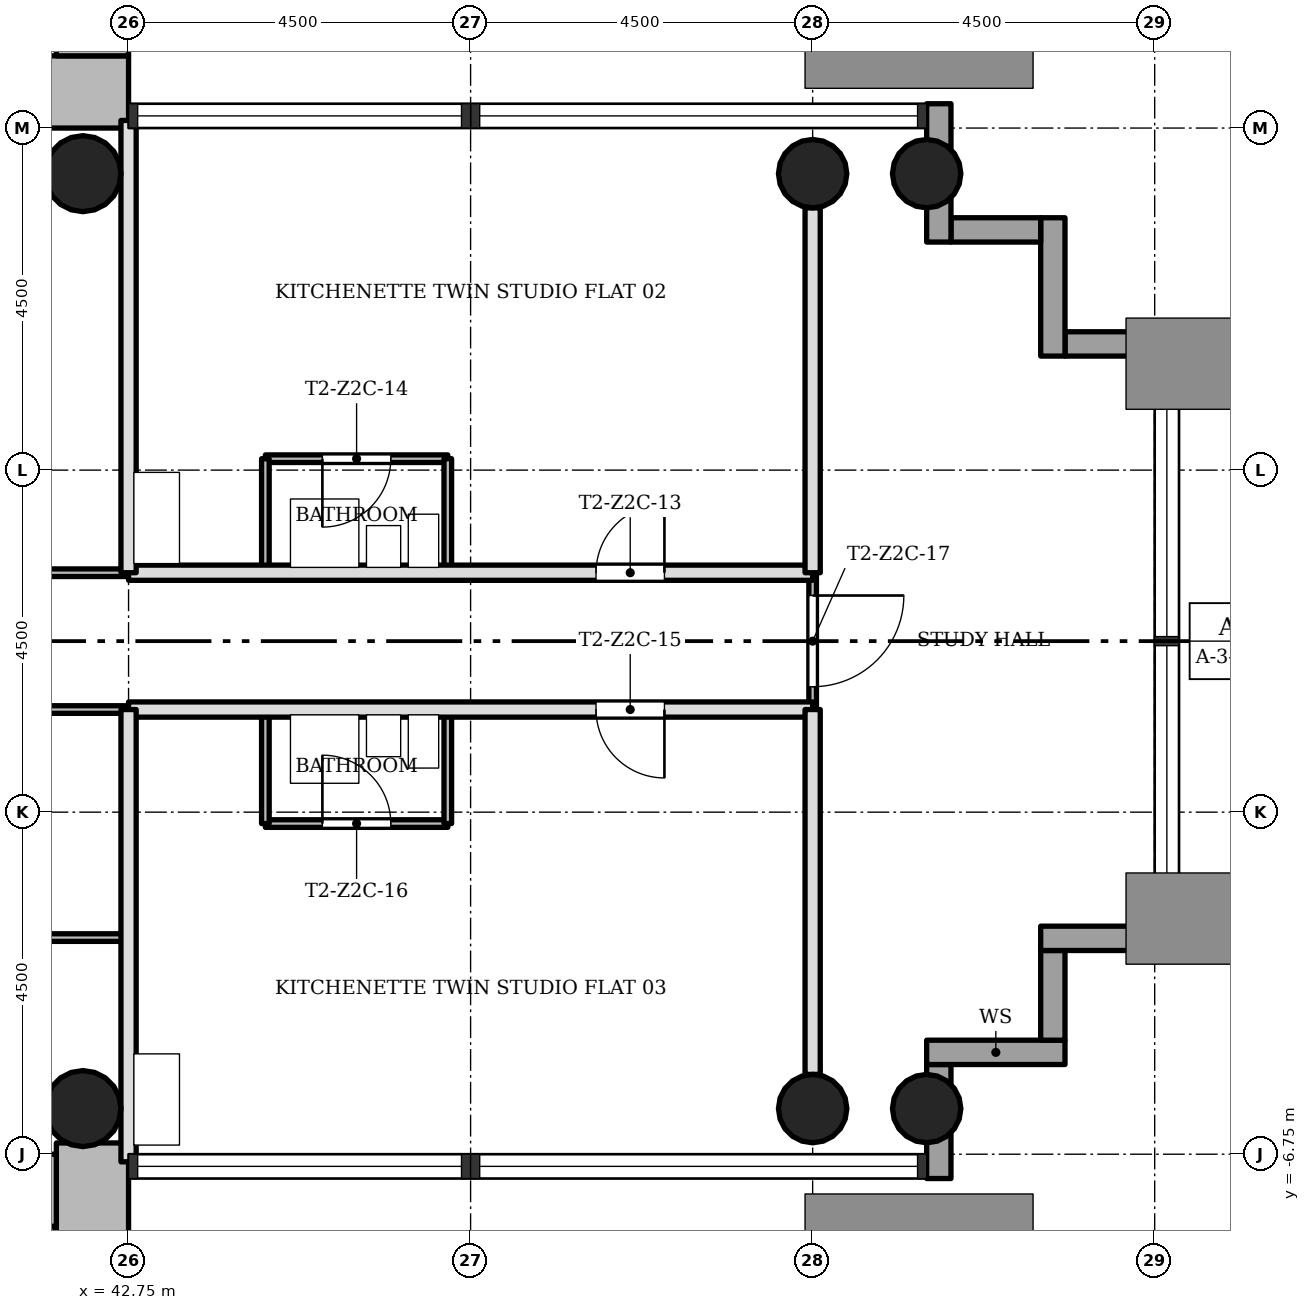
"""IFC4 building model, lengths in metres.
Left out: names, types, materials, properties, quantities, classifications, styles, units other than length and angle.
Written with IfcOpenShell. Run it as: python <this file> out.ifc"""

import sys

from ifc_helpers import new_model, si_unit, direction, frame, frame_2d, origin, origin_2d, place, context, subcontext, project, spatial, rectangle, hollow_circle, extrude, element, fill, save


model = new_model("IFC4")
c1 = context("Model", 3, precision=1e-05, world=origin(), true_north=direction((0.0, 1.0)))
c2 = subcontext(c1, "Body", "Model", "MODEL_VIEW")
j1 = project(units=[si_unit("LENGTHUNIT", "METRE"), si_unit("PLANEANGLEUNIT", "RADIAN")], contexts=[c1])
p1 = place(None, origin())
s1 = spatial("IfcSite", under=j1, at=p1, CompositionType="ELEMENT")
p2 = place(p1, origin())
s2 = spatial("IfcBuilding", under=s1, at=p2, CompositionType="ELEMENT")
p3 = place(p2, frame((0.0, 0.0, 93.6)))
s3 = spatial("IfcBuildingStorey", under=s2, at=p3, CompositionType="ELEMENT", Elevation=93.6)
p4 = place(p3, frame((30.2, 7.225, 0.0), z_axis=(0.0, 0.0, 1.0), x_axis=(1.0, 0.0, 0.0)))
e1 = element("IfcWall", 1, at=p4, inside=s3, PredefinedType="SHEAR", context=c2, shape_type="SweptSolid", body=[
    extrude(rectangle(XDim=12.55, YDim=0.95, at=frame_2d((6.275, 0.0))), origin(), (0.0, 0.0, 1.0), 3.4),
])
p5 = place(p4, frame((4.9, 0.0, 0.0)))
e2 = element("IfcOpeningElement", 2, at=p5, cuts=e1, PredefinedType="OPENING", context=c2, shape_type="SweptSolid", body=[
    extrude(rectangle(XDim=1.8, YDim=2.1, at=frame_2d((0.9, 1.05))), frame((0.0, 0.485, 0.0), z_axis=(0.0, -1.0, 0.0), x_axis=(1.0, 0.0, 0.0)), (0.0, 0.0, 1.0), 0.97),
])
p6 = place(p3, frame((42.275, 7.7, 0.0), z_axis=(0.0, 0.0, 1.0), x_axis=(0.0, 1.0, 0.0)))
e3 = element("IfcWall", 3, at=p6, inside=s3, PredefinedType="SHEAR", context=c2, shape_type="SweptSolid", body=[
    extrude(rectangle(XDim=8.05, YDim=0.95, at=frame_2d((4.025, 0.0))), origin(), (0.0, 0.0, 1.0), 3.4),
])
p7 = place(p3, frame((42.275, -14.8, 0.0), z_axis=(0.0, 0.0, 1.0), x_axis=(0.0, 1.0, 0.0)))
e4 = element("IfcWall", 4, at=p7, inside=s3, PredefinedType="SHEAR", context=c2, shape_type="SweptSolid", body=[
    extrude(rectangle(XDim=8.198, YDim=0.95, at=frame_2d((4.099, 0.0))), origin(), (0.0, 0.0, 1.0), 3.4),
])
p8 = place(p3, frame((41.8, -7.225, 0.0), z_axis=(0.0, 0.0, 1.0), x_axis=(-1.0, 0.0, 0.0)))
e5 = element("IfcWall", 5, at=p8, inside=s3, PredefinedType="SHEAR", context=c2, shape_type="SweptSolid", body=[
    extrude(rectangle(XDim=12.55, YDim=0.95, at=frame_2d((6.275, 0.0))), origin(), (0.0, 0.0, 1.0), 3.4),
])
p9 = place(p8, frame((4.9, 0.0, 0.0)))
e6 = element("IfcOpeningElement", 6, at=p9, cuts=e5, PredefinedType="OPENING", context=c2, shape_type="SweptSolid", body=[
    extrude(rectangle(XDim=1.8, YDim=2.1, at=frame_2d((0.9, 1.05))), frame((0.0, 0.485, 0.0), z_axis=(0.0, -1.0, 0.0), x_axis=(1.0, 0.0, 0.0)), (0.0, 0.0, 1.0), 0.97),
])
for number, where, z_axis, x_axis in (
    (7, (51.75, -6.15, 0.0), (0.0, 0.0, 1.0), (1.0, 0.0, 0.0)),
    (8, (51.75, 6.15, 0.0), (0.0, 0.0, 1.0), (1.0, 0.0, 0.0)),
    (9, (53.25, -6.15, 0.0), (0.0, 0.0, 1.0), (1.0, 0.0, 0.0)),
    (10, (53.25, 6.15, 0.0), (0.0, 0.0, 1.0), (1.0, 0.0, 0.0)),
):
    element("IfcColumn", number, at=place(p3, frame(where, z_axis=z_axis, x_axis=x_axis)), inside=s3, PredefinedType="COLUMN", context=c2, shape_type="SweptSolid", body=[
        extrude(hollow_circle(Radius=0.45, WallThickness=0.032, at=origin_2d()), origin(), (0.0, 0.0, 1.0), 3.4),
    ])
for number, where, z_axis, x_axis in (
    (11, (42.15, -6.15, 0.0), (0.0, 0.0, 1.0), (1.0, 0.0, 0.0)),
    (12, (42.15, 6.15, 0.0), (0.0, 0.0, 1.0), (1.0, 0.0, 0.0)),
):
    element("IfcColumn", number, at=place(p3, frame(where, z_axis=z_axis, x_axis=x_axis)), inside=s3, PredefinedType="COLUMN", context=c2, shape_type="SweptSolid", body=[
        extrude(hollow_circle(Radius=0.5, WallThickness=0.036, at=origin_2d()), origin(), (0.0, 0.0, 1.0), 3.4),
    ])
p10 = place(p3, frame((53.41, -7.07, -0.3), z_axis=(0.0, 0.0, 1.0), x_axis=(0.0, 1.0, 0.0)))
e13 = element("IfcWall", 13, at=p10, inside=s3, PredefinedType="STANDARD", context=c2, shape_type="SweptSolid", body=[
    extrude(rectangle(XDim=1.5, YDim=0.32, at=frame_2d((0.75, 0.0))), origin(), (0.0, 0.0, 1.0), 3.4),
])
p11 = place(p3, frame((53.25, -5.41, -0.3), z_axis=(0.0, 0.0, 1.0), x_axis=(1.0, 0.0, 0.0)))
e14 = element("IfcWall", 14, at=p11, inside=s3, PredefinedType="STANDARD", context=c2, shape_type="SweptSolid", body=[
    extrude(rectangle(XDim=1.82, YDim=0.32, at=frame_2d((0.91, 0.0))), origin(), (0.0, 0.0, 1.0), 3.4),
])
p12 = place(p3, frame((54.91, -5.25, -0.3), z_axis=(0.0, 0.0, 1.0), x_axis=(0.0, 1.0, 0.0)))
e15 = element("IfcWall", 15, at=p12, inside=s3, PredefinedType="STANDARD", context=c2, shape_type="SweptSolid", body=[
    extrude(rectangle(XDim=1.18, YDim=0.32, at=frame_2d((0.59, 0.0))), origin(), (0.0, 0.0, 1.0), 3.4),
])
p13 = place(p3, frame((54.75, -3.91, -0.3), z_axis=(0.0, 0.0, 1.0), x_axis=(1.0, 0.0, 0.0)))
e16 = element("IfcWall", 16, at=p13, inside=s3, PredefinedType="STANDARD", context=c2, shape_type="SweptSolid", body=[
    extrude(rectangle(XDim=1.82, YDim=0.32, at=frame_2d((0.91, 0.0))), origin(), (0.0, 0.0, 1.0), 3.4),
])
p14 = place(p3, frame((56.57, 3.91, -0.3), z_axis=(0.0, 0.0, 1.0), x_axis=(-1.0, 0.0, 0.0)))
e17 = element("IfcWall", 17, at=p14, inside=s3, PredefinedType="STANDARD", context=c2, shape_type="SweptSolid", body=[
    extrude(rectangle(XDim=1.5, YDim=0.32, at=frame_2d((0.75, 0.0))), origin(), (0.0, 0.0, 1.0), 3.4),
])
p15 = place(p3, frame((54.91, 3.75, -0.3), z_axis=(0.0, 0.0, 1.0), x_axis=(0.0, 1.0, 0.0)))
e18 = element("IfcWall", 18, at=p15, inside=s3, PredefinedType="STANDARD", context=c2, shape_type="SweptSolid", body=[
    extrude(rectangle(XDim=1.82, YDim=0.32, at=frame_2d((0.91, 0.0))), origin(), (0.0, 0.0, 1.0), 3.4),
])
p16 = place(p3, frame((54.75, 5.41, -0.3), z_axis=(0.0, 0.0, 1.0), x_axis=(-1.0, 0.0, 0.0)))
e19 = element("IfcWall", 19, at=p16, inside=s3, PredefinedType="STANDARD", context=c2, shape_type="SweptSolid", body=[
    extrude(rectangle(XDim=1.18, YDim=0.32, at=frame_2d((0.59, 0.0))), origin(), (0.0, 0.0, 1.0), 3.4),
])
p17 = place(p3, frame((53.41, 5.25, -0.3), z_axis=(0.0, 0.0, 1.0), x_axis=(0.0, 1.0, 0.0)))
e20 = element("IfcWall", 20, at=p17, inside=s3, PredefinedType="STANDARD", context=c2, shape_type="SweptSolid", body=[
    extrude(rectangle(XDim=1.82, YDim=0.32, at=frame_2d((0.91, 0.0))), origin(), (0.0, 0.0, 1.0), 3.4),
])
p18 = place(p3, frame((42.75, -3.9, 0.0), z_axis=(0.0, 0.0, 1.0), x_axis=(-1.0, 0.0, 0.0)))
e21 = element("IfcWall", 21, at=p18, inside=s3, PredefinedType="PARTITIONING", context=c2, shape_type="SweptSolid", body=[
    extrude(rectangle(XDim=5.25, YDim=0.1, at=frame_2d((2.625, 0.0))), origin(), (0.0, 0.0, 1.0), 3.0),
])
p19 = place(p3, frame((46.95, -2.4, 0.0), z_axis=(0.0, 0.0, 1.0), x_axis=(-1.0, 0.0, 0.0)))
e22 = element("IfcWall", 22, at=p19, inside=s3, PredefinedType="PARTITIONING", context=c2, shape_type="SweptSolid", body=[
    extrude(rectangle(XDim=2.4, YDim=0.1, at=frame_2d((1.2, 0.0))), origin(), (0.0, 0.0, 1.0), 3.0),
])
p20 = place(p19, frame((0.75, 0.0, 0.0)))
e23 = element("IfcOpeningElement", 23, at=p20, cuts=e22, PredefinedType="OPENING", context=c2, shape_type="SweptSolid", body=[
    extrude(rectangle(XDim=0.9, YDim=2.1, at=frame_2d((0.45, 1.05))), frame((0.0, 0.06, 0.0), z_axis=(0.0, -1.0, 0.0), x_axis=(1.0, 0.0, 0.0)), (0.0, 0.0, 1.0), 0.12),
])
p21 = place(p3, frame((42.75, -0.9, 0.0), z_axis=(0.0, 0.0, 1.0), x_axis=(-1.0, 0.0, 0.0)))
e24 = element("IfcWall", 24, at=p21, inside=s3, PredefinedType="PARTITIONING", context=c2, shape_type="SweptSolid", body=[
    extrude(rectangle(XDim=5.25, YDim=0.1, at=frame_2d((2.625, 0.0))), origin(), (0.0, 0.0, 1.0), 3.0),
])
p22 = place(p21, frame((2.175, 0.0, 0.0)))
e25 = element("IfcOpeningElement", 25, at=p22, cuts=e24, PredefinedType="OPENING", context=c2, shape_type="SweptSolid", body=[
    extrude(rectangle(XDim=0.9, YDim=2.1, at=frame_2d((0.45, 1.05))), frame((0.0, 0.06, 0.0), z_axis=(0.0, -1.0, 0.0), x_axis=(1.0, 0.0, 0.0)), (0.0, 0.0, 1.0), 0.12),
])
p23 = place(p3, frame((51.75, -0.9, 0.0), z_axis=(0.0, 0.0, 1.0), x_axis=(-1.0, 0.0, 0.0)))
e26 = element("IfcWall", 26, at=p23, inside=s3, PredefinedType="SOLIDWALL", context=c2, shape_type="SweptSolid", body=[
    extrude(rectangle(XDim=9.0, YDim=0.2, at=frame_2d((4.5, 0.0))), origin(), (0.0, 0.0, 1.0), 3.0),
])
p24 = place(p23, frame((1.95, 0.0, 0.0)))
e27 = element("IfcOpeningElement", 27, at=p24, cuts=e26, PredefinedType="OPENING", context=c2, shape_type="SweptSolid", body=[
    extrude(rectangle(XDim=0.9, YDim=2.1, at=frame_2d((0.45, 1.05))), frame((0.0, 0.11, 0.0), z_axis=(0.0, -1.0, 0.0), x_axis=(1.0, 0.0, 0.0)), (0.0, 0.0, 1.0), 0.22),
])
p25 = place(p3, frame((42.75, 0.9, 0.0), z_axis=(0.0, 0.0, 1.0), x_axis=(-1.0, 0.0, 0.0)))
e28 = element("IfcWall", 28, at=p25, inside=s3, PredefinedType="PARTITIONING", context=c2, shape_type="SweptSolid", body=[
    extrude(rectangle(XDim=5.25, YDim=0.1, at=frame_2d((2.625, 0.0))), origin(), (0.0, 0.0, 1.0), 3.0),
])
p26 = place(p25, frame((3.6, 0.0, 0.0)))
e29 = element("IfcOpeningElement", 29, at=p26, cuts=e28, PredefinedType="OPENING", context=c2, shape_type="SweptSolid", body=[
    extrude(rectangle(XDim=0.9, YDim=2.1, at=frame_2d((0.45, 1.05))), frame((0.0, 0.06, 0.0), z_axis=(0.0, -1.0, 0.0), x_axis=(1.0, 0.0, 0.0)), (0.0, 0.0, 1.0), 0.12),
])
p27 = place(p3, frame((51.75, 0.9, 0.0), z_axis=(0.0, 0.0, 1.0), x_axis=(-1.0, 0.0, 0.0)))
e30 = element("IfcWall", 30, at=p27, inside=s3, PredefinedType="SOLIDWALL", context=c2, shape_type="SweptSolid", body=[
    extrude(rectangle(XDim=9.0, YDim=0.2, at=frame_2d((4.5, 0.0))), origin(), (0.0, 0.0, 1.0), 3.0),
])
p28 = place(p27, frame((1.95, 0.0, 0.0)))
e31 = element("IfcOpeningElement", 31, at=p28, cuts=e30, PredefinedType="OPENING", context=c2, shape_type="SweptSolid", body=[
    extrude(rectangle(XDim=0.9, YDim=2.1, at=frame_2d((0.45, 1.05))), frame((0.0, 0.11, 0.0), z_axis=(0.0, -1.0, 0.0), x_axis=(1.0, 0.0, 0.0)), (0.0, 0.0, 1.0), 0.22),
])
p29 = place(p3, frame((46.95, 2.4, 0.0), z_axis=(0.0, 0.0, 1.0), x_axis=(-1.0, 0.0, 0.0)))
e32 = element("IfcWall", 32, at=p29, inside=s3, PredefinedType="PARTITIONING", context=c2, shape_type="SweptSolid", body=[
    extrude(rectangle(XDim=2.4, YDim=0.1, at=frame_2d((1.2, 0.0))), origin(), (0.0, 0.0, 1.0), 3.0),
])
p30 = place(p29, frame((0.75, 0.0, 0.0)))
e33 = element("IfcOpeningElement", 33, at=p30, cuts=e32, PredefinedType="OPENING", context=c2, shape_type="SweptSolid", body=[
    extrude(rectangle(XDim=0.9, YDim=2.1, at=frame_2d((0.45, 1.05))), frame((0.0, 0.06, 0.0), z_axis=(0.0, -1.0, 0.0), x_axis=(1.0, 0.0, 0.0)), (0.0, 0.0, 1.0), 0.12),
])
p31 = place(p3, frame((51.75, -0.9, 0.0), z_axis=(0.0, 0.0, 1.0), x_axis=(0.0, 1.0, 0.0)))
e34 = element("IfcWall", 34, at=p31, inside=s3, PredefinedType="PARTITIONING", context=c2, shape_type="SweptSolid", body=[
    extrude(rectangle(XDim=1.8, YDim=0.1, at=frame_2d((0.9, 0.0))), origin(), (0.0, 0.0, 1.0), 3.0),
])
p32 = place(p31, frame((0.3, 0.0, 0.0)))
e35 = element("IfcOpeningElement", 35, at=p32, cuts=e34, PredefinedType="OPENING", context=c2, shape_type="SweptSolid", body=[
    extrude(rectangle(XDim=1.2, YDim=2.1, at=frame_2d((0.6, 1.05))), frame((0.0, 0.06, 0.0), z_axis=(0.0, -1.0, 0.0), x_axis=(1.0, 0.0, 0.0)), (0.0, 0.0, 1.0), 0.12),
])
for number, where, z_axis, x_axis in (
    (36, (51.75, -5.7, 0.0), (0.0, 0.0, 1.0), (0.0, 1.0, 0.0)),
    (37, (51.75, 0.9, 0.0), (0.0, 0.0, 1.0), (0.0, 1.0, 0.0)),
):
    element("IfcWall", number, at=place(p3, frame(where, z_axis=z_axis, x_axis=x_axis)), inside=s3, PredefinedType="SOLIDWALL", context=c2, shape_type="SweptSolid", body=[
        extrude(rectangle(XDim=4.8, YDim=0.2, at=frame_2d((2.4, 0.0))), origin(), (0.0, 0.0, 1.0), 3.0),
    ])
for number, where, z_axis, x_axis in (
    (38, (46.95, -2.4, 0.0), (0.0, 0.0, 1.0), (0.0, 1.0, 0.0)),
    (39, (46.95, 0.9, 0.0), (0.0, 0.0, 1.0), (0.0, 1.0, 0.0)),
    (40, (44.55, -2.4, 0.0), (0.0, 0.0, 1.0), (0.0, 1.0, 0.0)),
    (41, (44.55, 0.9, 0.0), (0.0, 0.0, 1.0), (0.0, 1.0, 0.0)),
):
    element("IfcWall", number, at=place(p3, frame(where, z_axis=z_axis, x_axis=x_axis)), inside=s3, PredefinedType="PARTITIONING", context=c2, shape_type="SweptSolid", body=[
        extrude(rectangle(XDim=1.5, YDim=0.1, at=frame_2d((0.75, 0.0))), origin(), (0.0, 0.0, 1.0), 3.0),
    ])
for number, where, z_axis, x_axis in (
    (42, (42.75, -6.85, 0.0), (0.0, 0.0, 1.0), (0.0, 1.0, 0.0)),
    (43, (42.75, 0.9, 0.0), (0.0, 0.0, 1.0), (0.0, 1.0, 0.0)),
):
    element("IfcWall", number, at=place(p3, frame(where, z_axis=z_axis, x_axis=x_axis)), inside=s3, PredefinedType="SOLIDWALL", context=c2, shape_type="SweptSolid", body=[
        extrude(rectangle(XDim=5.95, YDim=0.2, at=frame_2d((2.975, 0.0))), origin(), (0.0, 0.0, 1.0), 3.0),
    ])
p33 = place(p3, frame((37.9, -7.825, 0.0), z_axis=(0.0, 0.0, 1.0), x_axis=(1.0, 0.0, 0.0)))
e44 = element("IfcWall", 44, at=p33, inside=s3, PredefinedType="SHEAR", context=c2, shape_type="SweptSolid", body=[
    extrude(rectangle(XDim=3.9, YDim=0.25, at=frame_2d((1.95, 0.0))), origin(), (0.0, 0.0, 1.0), 3.4),
])
p34 = place(p28, origin())
e45 = element("IfcDoor", 45, at=p34, inside=s3, OperationType="SINGLE_SWING_LEFT", PredefinedType="DOOR", context=c2, shape_type="SweptSolid", body=[
    extrude(rectangle(XDim=0.9, YDim=2.1, at=frame_2d((0.45, 1.05))), frame((0.0, 0.025, 0.0), z_axis=(0.0, -1.0, 0.0), x_axis=(1.0, 0.0, 0.0)), (0.0, 0.0, 1.0), 0.05),
])
fill(e31, e45)
p35 = place(p30, origin())
e46 = element("IfcDoor", 46, at=p35, inside=s3, OperationType="SINGLE_SWING_LEFT", PredefinedType="DOOR", context=c2, shape_type="SweptSolid", body=[
    extrude(rectangle(XDim=0.9, YDim=2.1, at=frame_2d((0.45, 1.05))), frame((0.0, 0.025, 0.0), z_axis=(0.0, -1.0, 0.0), x_axis=(1.0, 0.0, 0.0)), (0.0, 0.0, 1.0), 0.05),
])
fill(e33, e46)
p36 = place(p24, origin())
e47 = element("IfcDoor", 47, at=p36, inside=s3, OperationType="SINGLE_SWING_RIGHT", PredefinedType="DOOR", context=c2, shape_type="SweptSolid", body=[
    extrude(rectangle(XDim=0.9, YDim=2.1, at=frame_2d((0.45, 1.05))), frame((0.0, 0.025, 0.0), z_axis=(0.0, -1.0, 0.0), x_axis=(1.0, 0.0, 0.0)), (0.0, 0.0, 1.0), 0.05),
])
fill(e27, e47)
p37 = place(p20, origin())
e48 = element("IfcDoor", 48, at=p37, inside=s3, OperationType="SINGLE_SWING_RIGHT", PredefinedType="DOOR", context=c2, shape_type="SweptSolid", body=[
    extrude(rectangle(XDim=0.9, YDim=2.1, at=frame_2d((0.45, 1.05))), frame((0.0, 0.025, 0.0), z_axis=(0.0, -1.0, 0.0), x_axis=(1.0, 0.0, 0.0)), (0.0, 0.0, 1.0), 0.05),
])
fill(e23, e48)
p38 = place(p32, origin())
e49 = element("IfcDoor", 49, at=p38, inside=s3, OperationType="SINGLE_SWING_RIGHT", PredefinedType="DOOR", context=c2, shape_type="SweptSolid", body=[
    extrude(rectangle(XDim=1.2, YDim=2.1, at=frame_2d((0.6, 1.05))), frame((0.0, 0.025, 0.0), z_axis=(0.0, -1.0, 0.0), x_axis=(1.0, 0.0, 0.0)), (0.0, 0.0, 1.0), 0.05),
])
fill(e35, e49)
save(model, sys.argv[1])
